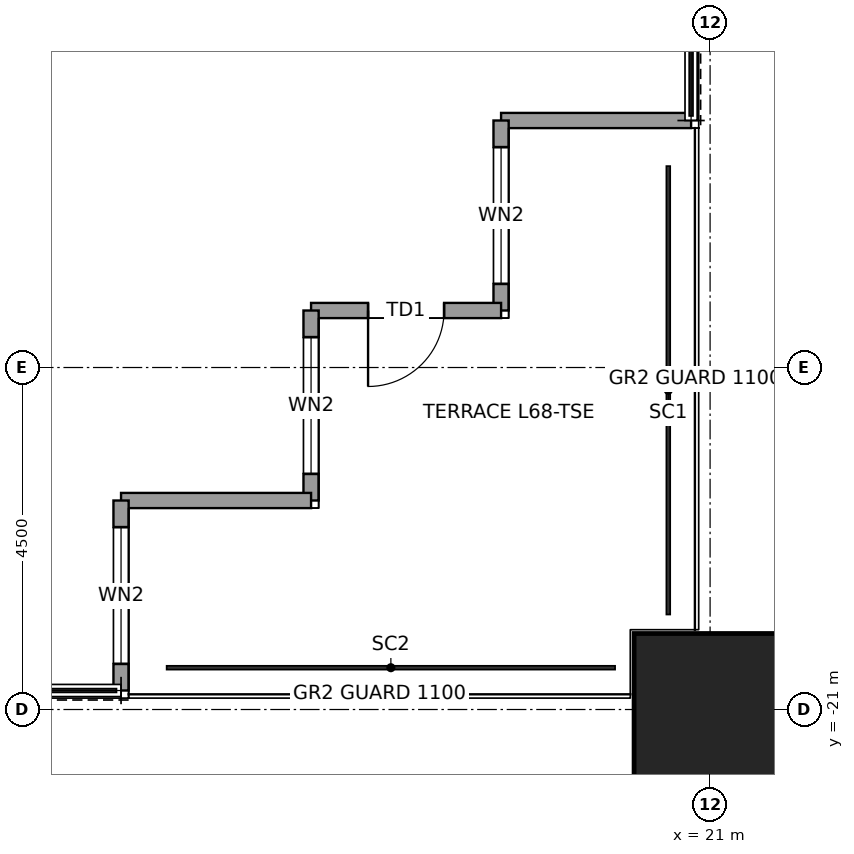
"""IFC4 building model, lengths in metres.
Left out: names, types, materials, properties, quantities, classifications, styles, units other than length and angle.
Written with IfcOpenShell. Run it as: python <this file> out.ifc"""

import sys

from ifc_helpers import new_model, si_unit, direction, frame, frame_2d, origin, origin_2d, place, context, subcontext, project, spatial, rectangle, hollow_rectangle, extrude, element, fill, save


model = new_model("IFC4")
c1 = context("Model", 3, precision=1e-05, world=origin(), true_north=direction((0.0, 1.0)))
c2 = subcontext(c1, "Body", "Model", "MODEL_VIEW")
j1 = project(units=[si_unit("LENGTHUNIT", "METRE"), si_unit("PLANEANGLEUNIT", "RADIAN")], contexts=[c1])
p1 = place(None, origin())
s1 = spatial("IfcSite", under=j1, at=p1, CompositionType="ELEMENT")
p2 = place(p1, origin())
s2 = spatial("IfcBuilding", under=s1, at=p2, CompositionType="ELEMENT")
p3 = place(p2, frame((0.0, 0.0, 307.9)))
s3 = spatial("IfcBuildingStorey", under=s2, at=p3, CompositionType="ELEMENT", Elevation=307.9)
p4 = place(p3, frame((21.0, -21.0, 0.0), z_axis=(0.0, 0.0, 1.0), x_axis=(1.0, 0.0, 0.0)))
e1 = element("IfcColumn", 1, at=p4, inside=s3, PredefinedType="COLUMN", context=c2, shape_type="SweptSolid", body=[
    extrude(hollow_rectangle(XDim=2.0, YDim=2.0, WallThickness=0.095, at=origin_2d()), origin(), (0.0, 0.0, 1.0), 4.0),
])
p5 = place(p3, frame((20.75, -13.25, 0.0), z_axis=(0.0, 0.0, 1.0), x_axis=(-1.0, 0.0, 0.0)))
e2 = element("IfcWall", 2, at=p5, inside=s3, PredefinedType="SOLIDWALL", context=c2, shape_type="SweptSolid", body=[
    extrude(rectangle(XDim=2.5, YDim=0.2, at=frame_2d((1.25, 0.0))), origin(), (0.0, 0.0, 1.0), 3.85),
])
p6 = place(p3, frame((18.25, -13.25, 0.0), z_axis=(0.0, 0.0, 1.0), x_axis=(0.0, -1.0, 0.0)))
e3 = element("IfcWall", 3, at=p6, inside=s3, PredefinedType="SOLIDWALL", context=c2, shape_type="SweptSolid", body=[
    extrude(rectangle(XDim=2.5, YDim=0.2, at=frame_2d((1.25, 0.0))), origin(), (0.0, 0.0, 1.0), 3.85),
])
p7 = place(p6, frame((0.35, 0.0, 0.3)))
e4 = element("IfcOpeningElement", 4, at=p7, cuts=e3, PredefinedType="OPENING", context=c2, shape_type="SweptSolid", body=[
    extrude(rectangle(XDim=1.8, YDim=2.4, at=frame_2d((0.9, 1.2))), frame((0.0, 0.11, 0.0), z_axis=(0.0, -1.0, 0.0), x_axis=(1.0, 0.0, 0.0)), (0.0, 0.0, 1.0), 0.22),
])
p8 = place(p3, frame((18.25, -15.75, 0.0), z_axis=(0.0, 0.0, 1.0), x_axis=(-1.0, 0.0, 0.0)))
e5 = element("IfcWall", 5, at=p8, inside=s3, PredefinedType="SOLIDWALL", context=c2, shape_type="SweptSolid", body=[
    extrude(rectangle(XDim=2.5, YDim=0.2, at=frame_2d((1.25, 0.0))), origin(), (0.0, 0.0, 1.0), 3.317),
])
p9 = place(p8, frame((0.75, 0.0, 0.0)))
e6 = element("IfcOpeningElement", 6, at=p9, cuts=e5, PredefinedType="OPENING", context=c2, shape_type="SweptSolid", body=[
    extrude(rectangle(XDim=1.0, YDim=2.4, at=frame_2d((0.5, 1.2))), frame((0.0, 0.11, 0.0), z_axis=(0.0, -1.0, 0.0), x_axis=(1.0, 0.0, 0.0)), (0.0, 0.0, 1.0), 0.22),
])
p10 = place(p3, frame((15.75, -15.75, 0.0), z_axis=(0.0, 0.0, 1.0), x_axis=(0.0, -1.0, 0.0)))
e7 = element("IfcWall", 7, at=p10, inside=s3, PredefinedType="SOLIDWALL", context=c2, shape_type="SweptSolid", body=[
    extrude(rectangle(XDim=2.5, YDim=0.2, at=frame_2d((1.25, 0.0))), origin(), (0.0, 0.0, 1.0), 3.85),
])
p11 = place(p10, frame((0.35, 0.0, 0.3)))
e8 = element("IfcOpeningElement", 8, at=p11, cuts=e7, PredefinedType="OPENING", context=c2, shape_type="SweptSolid", body=[
    extrude(rectangle(XDim=1.8, YDim=2.4, at=frame_2d((0.9, 1.2))), frame((0.0, 0.11, 0.0), z_axis=(0.0, -1.0, 0.0), x_axis=(1.0, 0.0, 0.0)), (0.0, 0.0, 1.0), 0.22),
])
p12 = place(p3, frame((15.75, -18.25, 0.0), z_axis=(0.0, 0.0, 1.0), x_axis=(-1.0, 0.0, 0.0)))
e9 = element("IfcWall", 9, at=p12, inside=s3, PredefinedType="SOLIDWALL", context=c2, shape_type="SweptSolid", body=[
    extrude(rectangle(XDim=2.5, YDim=0.2, at=frame_2d((1.25, 0.0))), origin(), (0.0, 0.0, 1.0), 3.85),
])
p13 = place(p3, frame((13.25, -18.25, 0.0), z_axis=(0.0, 0.0, 1.0), x_axis=(0.0, -1.0, 0.0)))
e10 = element("IfcWall", 10, at=p13, inside=s3, PredefinedType="SOLIDWALL", context=c2, shape_type="SweptSolid", body=[
    extrude(rectangle(XDim=2.5, YDim=0.2, at=frame_2d((1.25, 0.0))), origin(), (0.0, 0.0, 1.0), 3.85),
])
p14 = place(p13, frame((0.35, 0.0, 0.3)))
e11 = element("IfcOpeningElement", 11, at=p14, cuts=e10, PredefinedType="OPENING", context=c2, shape_type="SweptSolid", body=[
    extrude(rectangle(XDim=1.8, YDim=2.4, at=frame_2d((0.9, 1.2))), frame((0.0, 0.11, 0.0), z_axis=(0.0, -1.0, 0.0), x_axis=(1.0, 0.0, 0.0)), (0.0, 0.0, 1.0), 0.22),
])
p15 = place(p7, origin())
e12 = element("IfcWindow", 12, at=p15, inside=s3, PartitioningType="SINGLE_PANEL", PredefinedType="WINDOW", context=c2, shape_type="SweptSolid", body=[
    extrude(rectangle(XDim=1.8, YDim=2.4, at=frame_2d((0.9, 1.2))), frame((0.0, 0.03, 0.0), z_axis=(0.0, -1.0, 0.0), x_axis=(1.0, 0.0, 0.0)), (0.0, 0.0, 1.0), 0.06),
])
fill(e4, e12)
p16 = place(p9, origin())
e13 = element("IfcDoor", 13, at=p16, inside=s3, OperationType="SINGLE_SWING_RIGHT", PredefinedType="DOOR", context=c2, shape_type="SweptSolid", body=[
    extrude(rectangle(XDim=1.0, YDim=2.4, at=frame_2d((0.5, 1.2))), frame((0.0, 0.025, 0.0), z_axis=(0.0, -1.0, 0.0), x_axis=(1.0, 0.0, 0.0)), (0.0, 0.0, 1.0), 0.05),
])
fill(e6, e13)
p17 = place(p11, origin())
e14 = element("IfcWindow", 14, at=p17, inside=s3, PartitioningType="SINGLE_PANEL", PredefinedType="WINDOW", context=c2, shape_type="SweptSolid", body=[
    extrude(rectangle(XDim=1.8, YDim=2.4, at=frame_2d((0.9, 1.2))), frame((0.0, 0.03, 0.0), z_axis=(0.0, -1.0, 0.0), x_axis=(1.0, 0.0, 0.0)), (0.0, 0.0, 1.0), 0.06),
])
fill(e8, e14)
p18 = place(p14, origin())
e15 = element("IfcWindow", 15, at=p18, inside=s3, PartitioningType="SINGLE_PANEL", PredefinedType="WINDOW", context=c2, shape_type="SweptSolid", body=[
    extrude(rectangle(XDim=1.8, YDim=2.4, at=frame_2d((0.9, 1.2))), frame((0.0, 0.03, 0.0), z_axis=(0.0, -1.0, 0.0), x_axis=(1.0, 0.0, 0.0)), (0.0, 0.0, 1.0), 0.06),
])
fill(e11, e15)
save(model, sys.argv[1])
